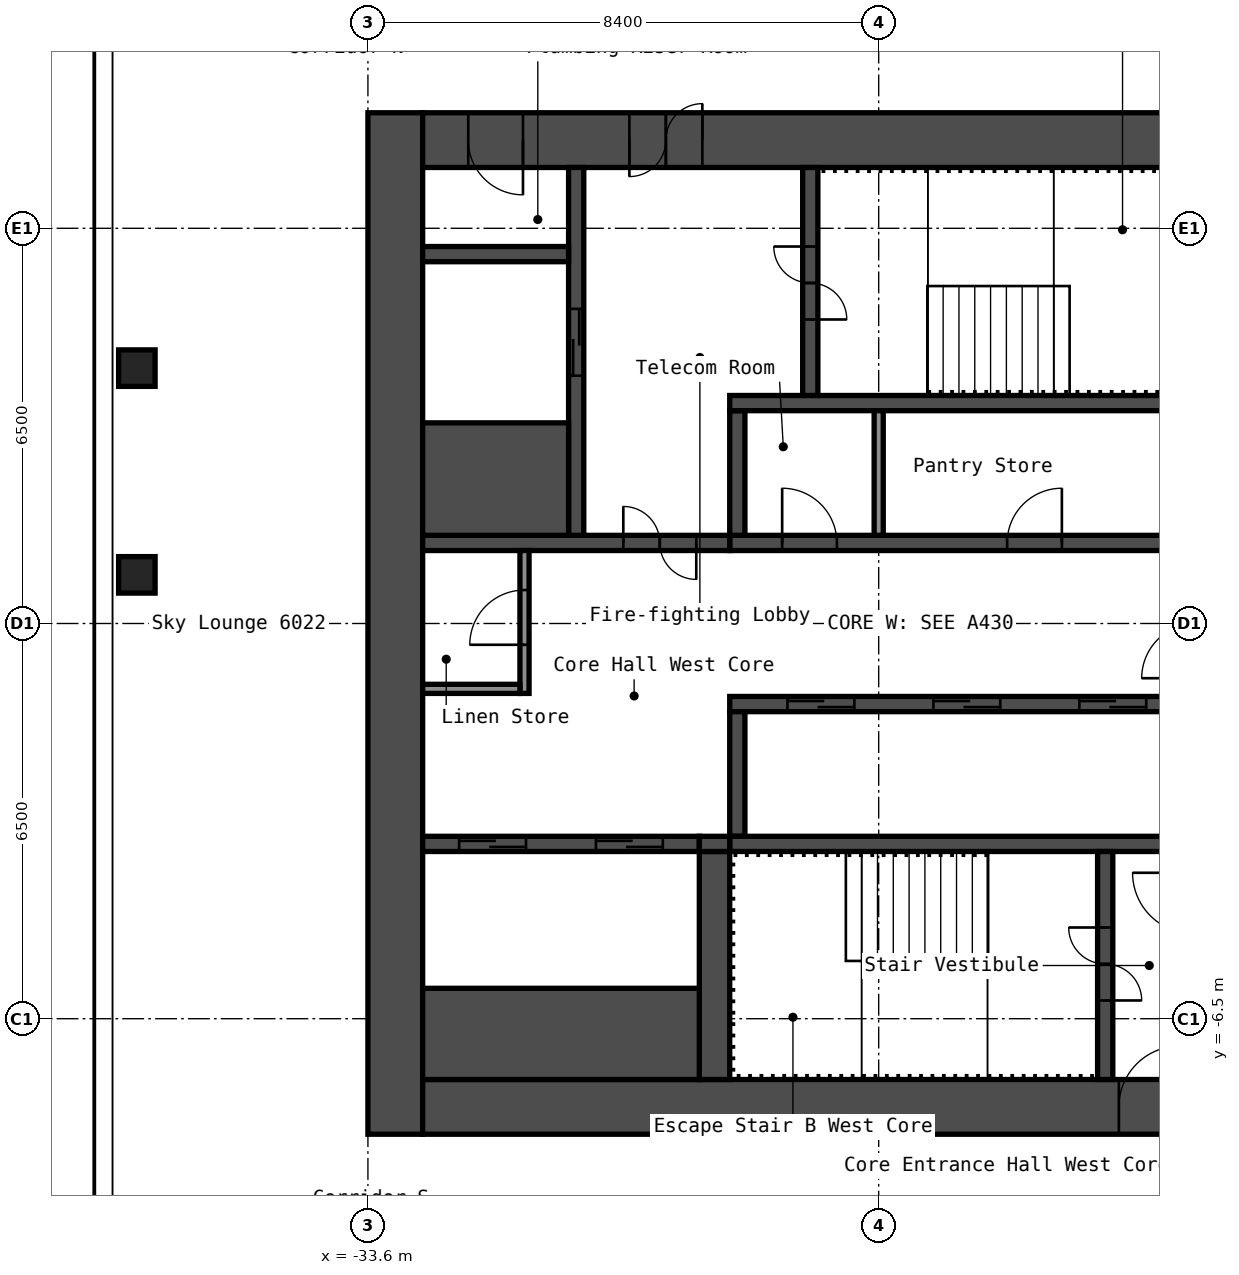
"""IFC4 building model, lengths in metres.
Left out: names, types, materials, properties, quantities, classifications, styles, units other than length and angle.
Written with IfcOpenShell. Run it as: python <this file> out.ifc"""

import sys

from ifc_helpers import new_model, si_unit, direction, frame, frame_2d, origin, origin_2d, place, context, subcontext, project, spatial, rectangle, hollow_rectangle, extrude, element, fill, save


model = new_model("IFC4")
c1 = context("Model", 3, precision=1e-05, world=origin(), true_north=direction((0.0, 1.0)))
c2 = subcontext(c1, "Body", "Model", "MODEL_VIEW")
j1 = project(units=[si_unit("LENGTHUNIT", "METRE"), si_unit("PLANEANGLEUNIT", "RADIAN")], contexts=[c1])
p1 = place(None, origin())
s1 = spatial("IfcSite", under=j1, at=p1, CompositionType="ELEMENT")
p2 = place(p1, origin())
s2 = spatial("IfcBuilding", under=s1, at=p2, CompositionType="ELEMENT")
p3 = place(p2, frame((0.0, 0.0, 212.2)))
s3 = spatial("IfcBuildingStorey", under=s2, at=p3, CompositionType="ELEMENT", Elevation=212.2)
for number, where, z_axis, x_axis in (
    (1, (-37.4, 0.8, 0.0), (0.0, 0.0, 1.0), (1.0, 0.0, 0.0)),
    (2, (-37.4, 4.2, 0.0), (0.0, 0.0, 1.0), (1.0, 0.0, 0.0)),
):
    element("IfcColumn", number, at=place(p3, frame(where, z_axis=z_axis, x_axis=x_axis)), inside=s3, PredefinedType="COLUMN", context=c2, shape_type="SweptSolid", body=[
        extrude(hollow_rectangle(XDim=0.6, YDim=0.6, WallThickness=0.025, InnerFilletRadius=0.038, OuterFilletRadius=0.062, at=origin_2d()), origin(), (0.0, 0.0, 1.0), 2.75),
    ])
p4 = place(p3, frame((-33.15, -8.4, 0.0), z_axis=(0.0, 0.0, 1.0), x_axis=(0.0, 1.0, 0.0)))
e3 = element("IfcWall", 3, at=p4, inside=s3, PredefinedType="SHEAR", context=c2, shape_type="SweptSolid", body=[
    extrude(rectangle(XDim=16.8, YDim=0.9, at=frame_2d((8.4, 0.0))), origin(), (0.0, 0.0, 1.0), 2.75),
])
p5 = place(p3, frame((-32.7, 7.95, 0.0), z_axis=(0.0, 0.0, 1.0), x_axis=(1.0, 0.0, 0.0)))
e4 = element("IfcWall", 4, at=p5, inside=s3, PredefinedType="SHEAR", context=c2, shape_type="SweptSolid", body=[
    extrude(rectangle(XDim=15.0, YDim=0.9, at=frame_2d((7.5, 0.0))), origin(), (0.0, 0.0, 1.0), 2.75),
])
p6 = place(p5, frame((3.4, 0.0, 0.0)))
e5 = element("IfcOpeningElement", 5, at=p6, cuts=e4, PredefinedType="OPENING", context=c2, shape_type="SweptSolid", body=[
    extrude(rectangle(XDim=1.2, YDim=2.1, at=frame_2d((0.6, 1.05))), frame((0.0, 0.46, 0.0), z_axis=(0.0, -1.0, 0.0), x_axis=(1.0, 0.0, 0.0)), (0.0, 0.0, 1.0), 0.92),
])
p7 = place(p5, frame((0.75, 0.0, 0.0)))
e6 = element("IfcOpeningElement", 6, at=p7, cuts=e4, PredefinedType="OPENING", context=c2, shape_type="SweptSolid", body=[
    extrude(rectangle(XDim=0.9, YDim=2.1, at=frame_2d((0.45, 1.05))), frame((0.0, 0.46, 0.0), z_axis=(0.0, -1.0, 0.0), x_axis=(1.0, 0.0, 0.0)), (0.0, 0.0, 1.0), 0.92),
])
p8 = place(p3, frame((-32.7, -7.95, 0.0), z_axis=(0.0, 0.0, 1.0), x_axis=(1.0, 0.0, 0.0)))
e7 = element("IfcWall", 7, at=p8, inside=s3, PredefinedType="SHEAR", context=c2, shape_type="SweptSolid", body=[
    extrude(rectangle(XDim=15.0, YDim=0.9, at=frame_2d((7.5, 0.0))), origin(), (0.0, 0.0, 1.0), 2.75),
])
p9 = place(p8, frame((11.45, 0.0, 0.0)))
e8 = element("IfcOpeningElement", 8, at=p9, cuts=e7, PredefinedType="OPENING", context=c2, shape_type="SweptSolid", body=[
    extrude(rectangle(XDim=1.0, YDim=2.1, at=frame_2d((0.5, 1.05))), frame((0.0, 0.46, 0.0), z_axis=(0.0, -1.0, 0.0), x_axis=(1.0, 0.0, 0.0)), (0.0, 0.0, 1.0), 0.92),
])
p10 = place(p3, frame((-27.65, 1.325, 0.0), z_axis=(0.0, 0.0, 1.0), x_axis=(1.0, 0.0, 0.0)))
e9 = element("IfcWall", 9, at=p10, inside=s3, PredefinedType="SHEAR", context=c2, shape_type="SweptSolid", body=[
    extrude(rectangle(XDim=7.5, YDim=0.25, at=frame_2d((3.75, 0.0))), origin(), (0.0, 0.0, 1.0), 2.75),
])
p11 = place(p10, frame((4.562, 0.0, 0.0)))
e10 = element("IfcOpeningElement", 10, at=p11, cuts=e9, PredefinedType="OPENING", context=c2, shape_type="SweptSolid", body=[
    extrude(rectangle(XDim=0.9, YDim=2.1, at=frame_2d((0.45, 1.05))), frame((0.0, 0.135, 0.0), z_axis=(0.0, -1.0, 0.0), x_axis=(1.0, 0.0, 0.0)), (0.0, 0.0, 1.0), 0.27),
])
p12 = place(p10, frame((0.863, 0.0, 0.0)))
e11 = element("IfcOpeningElement", 11, at=p12, cuts=e9, PredefinedType="OPENING", context=c2, shape_type="SweptSolid", body=[
    extrude(rectangle(XDim=0.9, YDim=2.1, at=frame_2d((0.45, 1.05))), frame((0.0, 0.135, 0.0), z_axis=(0.0, -1.0, 0.0), x_axis=(1.0, 0.0, 0.0)), (0.0, 0.0, 1.0), 0.27),
])
p13 = place(p3, frame((-27.525, 1.45, 0.0), z_axis=(0.0, 0.0, 1.0), x_axis=(0.0, 1.0, 0.0)))
e12 = element("IfcWall", 12, at=p13, inside=s3, PredefinedType="SHEAR", context=c2, shape_type="SweptSolid", body=[
    extrude(rectangle(XDim=2.05, YDim=0.25, at=frame_2d((1.025, 0.0))), origin(), (0.0, 0.0, 1.0), 2.75),
])
p14 = place(p3, frame((-27.65, 3.625, 0.0), z_axis=(0.0, 0.0, 1.0), x_axis=(1.0, 0.0, 0.0)))
e13 = element("IfcWall", 13, at=p14, inside=s3, PredefinedType="SHEAR", context=c2, shape_type="SweptSolid", body=[
    extrude(rectangle(XDim=7.5, YDim=0.25, at=frame_2d((3.75, 0.0))), origin(), (0.0, 0.0, 1.0), 2.75),
])
p15 = place(p3, frame((-26.325, 3.75, 0.0), z_axis=(0.0, 0.0, 1.0), x_axis=(0.0, 1.0, 0.0)))
e14 = element("IfcWall", 14, at=p15, inside=s3, PredefinedType="SHEAR", context=c2, shape_type="SweptSolid", body=[
    extrude(rectangle(XDim=3.75, YDim=0.25, at=frame_2d((1.875, 0.0))), origin(), (0.0, 0.0, 1.0), 2.75),
])
p16 = place(p15, frame((1.25, 0.0, 0.0)))
e15 = element("IfcOpeningElement", 15, at=p16, cuts=e14, PredefinedType="OPENING", context=c2, shape_type="SweptSolid", body=[
    extrude(rectangle(XDim=1.2, YDim=2.1, at=frame_2d((0.6, 1.05))), frame((0.0, 0.135, 0.0), z_axis=(0.0, -1.0, 0.0), x_axis=(1.0, 0.0, 0.0)), (0.0, 0.0, 1.0), 0.27),
])
p17 = place(p3, frame((-32.7, 1.325, 0.0), z_axis=(0.0, 0.0, 1.0), x_axis=(1.0, 0.0, 0.0)))
e16 = element("IfcWall", 16, at=p17, inside=s3, PredefinedType="SHEAR", context=c2, shape_type="SweptSolid", body=[
    extrude(rectangle(XDim=5.05, YDim=0.25, at=frame_2d((2.525, 0.0))), origin(), (0.0, 0.0, 1.0), 2.75),
])
p18 = place(p17, frame((3.3, 0.0, 0.0)))
e17 = element("IfcOpeningElement", 17, at=p18, cuts=e16, PredefinedType="OPENING", context=c2, shape_type="SweptSolid", body=[
    extrude(rectangle(XDim=1.2, YDim=2.1, at=frame_2d((0.6, 1.05))), frame((0.0, 0.135, 0.0), z_axis=(0.0, -1.0, 0.0), x_axis=(1.0, 0.0, 0.0)), (0.0, 0.0, 1.0), 0.27),
])
p19 = place(p3, frame((-30.175, 1.45, 0.0), z_axis=(0.0, 0.0, 1.0), x_axis=(0.0, 1.0, 0.0)))
e18 = element("IfcWall", 18, at=p19, inside=s3, PredefinedType="SHEAR", context=c2, shape_type="SweptSolid", body=[
    extrude(rectangle(XDim=6.05, YDim=0.25, at=frame_2d((3.025, 0.0))), origin(), (0.0, 0.0, 1.0), 2.75),
])
p20 = place(p19, frame((2.625, 0.0, 0.0)))
e19 = element("IfcOpeningElement", 19, at=p20, cuts=e18, PredefinedType="OPENING", context=c2, shape_type="SweptSolid", body=[
    extrude(rectangle(XDim=1.1, YDim=2.1, at=frame_2d((0.55, 1.05))), frame((0.0, 0.135, 0.0), z_axis=(0.0, -1.0, 0.0), x_axis=(1.0, 0.0, 0.0)), (0.0, 0.0, 1.0), 0.27),
])
p21 = place(p3, frame((-32.7, 2.375, 0.0), z_axis=(0.0, 0.0, 1.0), x_axis=(1.0, 0.0, 0.0)))
e20 = element("IfcWall", 20, at=p21, inside=s3, PredefinedType="SHEAR", context=c2, shape_type="SweptSolid", body=[
    extrude(rectangle(XDim=2.4, YDim=1.85, at=frame_2d((1.2, 0.0))), origin(), (0.0, 0.0, 1.0), 2.75),
])
p22 = place(p3, frame((-32.7, 6.075, 0.0), z_axis=(0.0, 0.0, 1.0), x_axis=(1.0, 0.0, 0.0)))
e21 = element("IfcWall", 21, at=p22, inside=s3, PredefinedType="SHEAR", context=c2, shape_type="SweptSolid", body=[
    extrude(rectangle(XDim=2.4, YDim=0.25, at=frame_2d((1.2, 0.0))), origin(), (0.0, 0.0, 1.0), 2.75),
])
p23 = place(p3, frame((-27.65, -1.325, 0.0), z_axis=(0.0, 0.0, 1.0), x_axis=(1.0, 0.0, 0.0)))
e22 = element("IfcWall", 22, at=p23, inside=s3, PredefinedType="SHEAR", context=c2, shape_type="SweptSolid", body=[
    extrude(rectangle(XDim=7.5, YDim=0.25, at=frame_2d((3.75, 0.0))), origin(), (0.0, 0.0, 1.0), 2.75),
])
p24 = place(p23, frame((5.75, 0.0, 0.0)))
e23 = element("IfcOpeningElement", 23, at=p24, cuts=e22, PredefinedType="OPENING", context=c2, shape_type="SweptSolid", body=[
    extrude(rectangle(XDim=1.1, YDim=2.1, at=frame_2d((0.55, 1.05))), frame((0.0, 0.135, 0.0), z_axis=(0.0, -1.0, 0.0), x_axis=(1.0, 0.0, 0.0)), (0.0, 0.0, 1.0), 0.27),
])
p25 = place(p23, frame((3.35, 0.0, 0.0)))
e24 = element("IfcOpeningElement", 24, at=p25, cuts=e22, PredefinedType="OPENING", context=c2, shape_type="SweptSolid", body=[
    extrude(rectangle(XDim=1.1, YDim=2.1, at=frame_2d((0.55, 1.05))), frame((0.0, 0.135, 0.0), z_axis=(0.0, -1.0, 0.0), x_axis=(1.0, 0.0, 0.0)), (0.0, 0.0, 1.0), 0.27),
])
p26 = place(p23, frame((0.95, 0.0, 0.0)))
e25 = element("IfcOpeningElement", 25, at=p26, cuts=e22, PredefinedType="OPENING", context=c2, shape_type="SweptSolid", body=[
    extrude(rectangle(XDim=1.1, YDim=2.1, at=frame_2d((0.55, 1.05))), frame((0.0, 0.135, 0.0), z_axis=(0.0, -1.0, 0.0), x_axis=(1.0, 0.0, 0.0)), (0.0, 0.0, 1.0), 0.27),
])
p27 = place(p3, frame((-27.525, -3.5, 0.0), z_axis=(0.0, 0.0, 1.0), x_axis=(0.0, 1.0, 0.0)))
e26 = element("IfcWall", 26, at=p27, inside=s3, PredefinedType="SHEAR", context=c2, shape_type="SweptSolid", body=[
    extrude(rectangle(XDim=2.05, YDim=0.25, at=frame_2d((1.025, 0.0))), origin(), (0.0, 0.0, 1.0), 2.75),
])
p28 = place(p3, frame((-27.65, -3.625, 0.0), z_axis=(0.0, 0.0, 1.0), x_axis=(1.0, 0.0, 0.0)))
e27 = element("IfcWall", 27, at=p28, inside=s3, PredefinedType="SHEAR", context=c2, shape_type="SweptSolid", body=[
    extrude(rectangle(XDim=7.5, YDim=0.25, at=frame_2d((3.75, 0.0))), origin(), (0.0, 0.0, 1.0), 2.75),
])
p29 = place(p3, frame((-21.475, -7.5, 0.0), z_axis=(0.0, 0.0, 1.0), x_axis=(0.0, 1.0, 0.0)))
e28 = element("IfcWall", 28, at=p29, inside=s3, PredefinedType="SHEAR", context=c2, shape_type="SweptSolid", body=[
    extrude(rectangle(XDim=3.75, YDim=0.25, at=frame_2d((1.875, 0.0))), origin(), (0.0, 0.0, 1.0), 2.75),
])
p30 = place(p29, frame((1.3, 0.0, 0.0)))
e29 = element("IfcOpeningElement", 29, at=p30, cuts=e28, PredefinedType="OPENING", context=c2, shape_type="SweptSolid", body=[
    extrude(rectangle(XDim=1.2, YDim=2.1, at=frame_2d((0.6, 1.05))), frame((0.0, 0.135, 0.0), z_axis=(0.0, -1.0, 0.0), x_axis=(1.0, 0.0, 0.0)), (0.0, 0.0, 1.0), 0.27),
])
p31 = place(p3, frame((-27.9, -7.5, 0.0), z_axis=(0.0, 0.0, 1.0), x_axis=(0.0, 1.0, 0.0)))
e30 = element("IfcWall", 30, at=p31, inside=s3, PredefinedType="SHEAR", context=c2, shape_type="SweptSolid", body=[
    extrude(rectangle(XDim=3.75, YDim=0.5, at=frame_2d((1.875, 0.0))), origin(), (0.0, 0.0, 1.0), 2.75),
])
p32 = place(p3, frame((-32.7, -3.625, 0.0), z_axis=(0.0, 0.0, 1.0), x_axis=(1.0, 0.0, 0.0)))
e31 = element("IfcWall", 31, at=p32, inside=s3, PredefinedType="SHEAR", context=c2, shape_type="SweptSolid", body=[
    extrude(rectangle(XDim=4.55, YDim=0.25, at=frame_2d((2.275, 0.0))), origin(), (0.0, 0.0, 1.0), 2.75),
])
p33 = place(p32, frame((2.85, 0.0, 0.0)))
e32 = element("IfcOpeningElement", 32, at=p33, cuts=e31, PredefinedType="OPENING", context=c2, shape_type="SweptSolid", body=[
    extrude(rectangle(XDim=1.1, YDim=2.1, at=frame_2d((0.55, 1.05))), frame((0.0, 0.135, 0.0), z_axis=(0.0, -1.0, 0.0), x_axis=(1.0, 0.0, 0.0)), (0.0, 0.0, 1.0), 0.27),
])
p34 = place(p32, frame((0.6, 0.0, 0.0)))
e33 = element("IfcOpeningElement", 33, at=p34, cuts=e31, PredefinedType="OPENING", context=c2, shape_type="SweptSolid", body=[
    extrude(rectangle(XDim=1.1, YDim=2.1, at=frame_2d((0.55, 1.05))), frame((0.0, 0.135, 0.0), z_axis=(0.0, -1.0, 0.0), x_axis=(1.0, 0.0, 0.0)), (0.0, 0.0, 1.0), 0.27),
])
p35 = place(p3, frame((-32.7, -6.75, 0.0), z_axis=(0.0, 0.0, 1.0), x_axis=(1.0, 0.0, 0.0)))
e34 = element("IfcWall", 34, at=p35, inside=s3, PredefinedType="SHEAR", context=c2, shape_type="SweptSolid", body=[
    extrude(rectangle(XDim=4.55, YDim=1.5, at=frame_2d((2.275, 0.0))), origin(), (0.0, 0.0, 1.0), 2.75),
])
p36 = place(p3, frame((-28.15, -3.625, 0.0), z_axis=(0.0, 0.0, 1.0), x_axis=(1.0, 0.0, 0.0)))
e35 = element("IfcWall", 35, at=p36, inside=s3, PredefinedType="SHEAR", context=c2, shape_type="SweptSolid", body=[
    extrude(rectangle(XDim=0.5, YDim=0.25, at=frame_2d((0.25, 0.0))), origin(), (0.0, 0.0, 1.0), 2.75),
])
p37 = place(p3, frame((-31.025, -1.15, 0.0), z_axis=(0.0, 0.0, 1.0), x_axis=(0.0, 1.0, 0.0)))
e36 = element("IfcWall", 36, at=p37, inside=s3, PredefinedType="PARTITIONING", context=c2, shape_type="SweptSolid", body=[
    extrude(rectangle(XDim=2.35, YDim=0.15, at=frame_2d((1.175, 0.0))), origin(), (0.0, 0.0, 1.0), 2.75),
])
p38 = place(p37, frame((0.8, 0.0, 0.0)))
e37 = element("IfcOpeningElement", 37, at=p38, cuts=e36, PredefinedType="OPENING", context=c2, shape_type="SweptSolid", body=[
    extrude(rectangle(XDim=0.9, YDim=2.1, at=frame_2d((0.45, 1.05))), frame((0.0, 0.085, 0.0), z_axis=(0.0, -1.0, 0.0), x_axis=(1.0, 0.0, 0.0)), (0.0, 0.0, 1.0), 0.17),
])
p39 = place(p3, frame((-32.7, -1.075, 0.0), z_axis=(0.0, 0.0, 1.0), x_axis=(1.0, 0.0, 0.0)))
e38 = element("IfcWall", 38, at=p39, inside=s3, PredefinedType="PARTITIONING", context=c2, shape_type="SweptSolid", body=[
    extrude(rectangle(XDim=1.6, YDim=0.15, at=frame_2d((0.8, 0.0))), origin(), (0.0, 0.0, 1.0), 2.75),
])
p40 = place(p3, frame((-25.2, 1.45, 0.0), z_axis=(0.0, 0.0, 1.0), x_axis=(0.0, 1.0, 0.0)))
e39 = element("IfcWall", 39, at=p40, inside=s3, PredefinedType="PARTITIONING", context=c2, shape_type="SweptSolid", body=[
    extrude(rectangle(XDim=2.05, YDim=0.15, at=frame_2d((1.025, 0.0))), origin(), (0.0, 0.0, 1.0), 2.75),
])
p41 = place(p6, origin())
e40 = element("IfcDoor", 40, at=p41, inside=s3, OperationType="DOUBLE_DOOR_SINGLE_SWING", PredefinedType="DOOR", context=c2, shape_type="SweptSolid", body=[
    extrude(rectangle(XDim=1.2, YDim=2.1, at=frame_2d((0.6, 1.05))), frame((0.0, 0.025, 0.0), z_axis=(0.0, -1.0, 0.0), x_axis=(1.0, 0.0, 0.0)), (0.0, 0.0, 1.0), 0.05),
])
fill(e5, e40)
p42 = place(p7, origin())
e41 = element("IfcDoor", 41, at=p42, inside=s3, OperationType="SINGLE_SWING_RIGHT", PredefinedType="DOOR", context=c2, shape_type="SweptSolid", body=[
    extrude(rectangle(XDim=0.9, YDim=2.1, at=frame_2d((0.45, 1.05))), frame((0.0, 0.025, 0.0), z_axis=(0.0, -1.0, 0.0), x_axis=(1.0, 0.0, 0.0)), (0.0, 0.0, 1.0), 0.05),
])
fill(e6, e41)
p43 = place(p9, origin())
e42 = element("IfcDoor", 42, at=p43, inside=s3, OperationType="SINGLE_SWING_LEFT", PredefinedType="DOOR", context=c2, shape_type="SweptSolid", body=[
    extrude(rectangle(XDim=1.0, YDim=2.1, at=frame_2d((0.5, 1.05))), frame((0.0, 0.025, 0.0), z_axis=(0.0, -1.0, 0.0), x_axis=(1.0, 0.0, 0.0)), (0.0, 0.0, 1.0), 0.05),
])
fill(e8, e42)
p44 = place(p16, origin())
e43 = element("IfcDoor", 43, at=p44, inside=s3, OperationType="DOUBLE_DOOR_SINGLE_SWING", PredefinedType="DOOR", context=c2, shape_type="SweptSolid", body=[
    extrude(rectangle(XDim=1.2, YDim=2.1, at=frame_2d((0.6, 1.05))), frame((0.0, 0.025, 0.0), z_axis=(0.0, -1.0, 0.0), x_axis=(1.0, 0.0, 0.0)), (0.0, 0.0, 1.0), 0.05),
])
fill(e15, e43)
p45 = place(p30, origin())
e44 = element("IfcDoor", 44, at=p45, inside=s3, OperationType="DOUBLE_DOOR_SINGLE_SWING", PredefinedType="DOOR", context=c2, shape_type="SweptSolid", body=[
    extrude(rectangle(XDim=1.2, YDim=2.1, at=frame_2d((0.6, 1.05))), frame((0.0, 0.025, 0.0), z_axis=(0.0, -1.0, 0.0), x_axis=(1.0, 0.0, 0.0)), (0.0, 0.0, 1.0), 0.05),
])
fill(e29, e44)
p46 = place(p18, origin())
e45 = element("IfcDoor", 45, at=p46, inside=s3, OperationType="DOUBLE_DOOR_SINGLE_SWING", PredefinedType="DOOR", context=c2, shape_type="SweptSolid", body=[
    extrude(rectangle(XDim=1.2, YDim=2.1, at=frame_2d((0.6, 1.05))), frame((0.0, 0.025, 0.0), z_axis=(0.0, -1.0, 0.0), x_axis=(1.0, 0.0, 0.0)), (0.0, 0.0, 1.0), 0.05),
])
fill(e17, e45)
p47 = place(p38, origin())
e46 = element("IfcDoor", 46, at=p47, inside=s3, OperationType="SINGLE_SWING_RIGHT", PredefinedType="DOOR", context=c2, shape_type="SweptSolid", body=[
    extrude(rectangle(XDim=0.9, YDim=2.1, at=frame_2d((0.45, 1.05))), frame((0.0, 0.025, 0.0), z_axis=(0.0, -1.0, 0.0), x_axis=(1.0, 0.0, 0.0)), (0.0, 0.0, 1.0), 0.05),
])
fill(e37, e46)
p48 = place(p11, origin())
e47 = element("IfcDoor", 47, at=p48, inside=s3, OperationType="SINGLE_SWING_LEFT", PredefinedType="DOOR", context=c2, shape_type="SweptSolid", body=[
    extrude(rectangle(XDim=0.9, YDim=2.1, at=frame_2d((0.45, 1.05))), frame((0.0, 0.025, 0.0), z_axis=(0.0, -1.0, 0.0), x_axis=(1.0, 0.0, 0.0)), (0.0, 0.0, 1.0), 0.05),
])
fill(e10, e47)
p49 = place(p12, origin())
e48 = element("IfcDoor", 48, at=p49, inside=s3, OperationType="SINGLE_SWING_RIGHT", PredefinedType="DOOR", context=c2, shape_type="SweptSolid", body=[
    extrude(rectangle(XDim=0.9, YDim=2.1, at=frame_2d((0.45, 1.05))), frame((0.0, 0.025, 0.0), z_axis=(0.0, -1.0, 0.0), x_axis=(1.0, 0.0, 0.0)), (0.0, 0.0, 1.0), 0.05),
])
fill(e11, e48)
p50 = place(p24, origin())
e49 = element("IfcDoor", 49, at=p50, inside=s3, OperationType="DOUBLE_DOOR_SLIDING", PredefinedType="DOOR", context=c2, shape_type="SweptSolid", body=[
    extrude(rectangle(XDim=1.1, YDim=2.1, at=frame_2d((0.55, 1.05))), frame((0.0, 0.025, 0.0), z_axis=(0.0, -1.0, 0.0), x_axis=(1.0, 0.0, 0.0)), (0.0, 0.0, 1.0), 0.05),
])
fill(e23, e49)
p51 = place(p25, origin())
e50 = element("IfcDoor", 50, at=p51, inside=s3, OperationType="DOUBLE_DOOR_SLIDING", PredefinedType="DOOR", context=c2, shape_type="SweptSolid", body=[
    extrude(rectangle(XDim=1.1, YDim=2.1, at=frame_2d((0.55, 1.05))), frame((0.0, 0.025, 0.0), z_axis=(0.0, -1.0, 0.0), x_axis=(1.0, 0.0, 0.0)), (0.0, 0.0, 1.0), 0.05),
])
fill(e24, e50)
p52 = place(p26, origin())
e51 = element("IfcDoor", 51, at=p52, inside=s3, OperationType="DOUBLE_DOOR_SLIDING", PredefinedType="DOOR", context=c2, shape_type="SweptSolid", body=[
    extrude(rectangle(XDim=1.1, YDim=2.1, at=frame_2d((0.55, 1.05))), frame((0.0, 0.025, 0.0), z_axis=(0.0, -1.0, 0.0), x_axis=(1.0, 0.0, 0.0)), (0.0, 0.0, 1.0), 0.05),
])
fill(e25, e51)
p53 = place(p20, origin())
e52 = element("IfcDoor", 52, at=p53, inside=s3, OperationType="DOUBLE_DOOR_SLIDING", PredefinedType="DOOR", context=c2, shape_type="SweptSolid", body=[
    extrude(rectangle(XDim=1.1, YDim=2.1, at=frame_2d((0.55, 1.05))), frame((0.0, 0.025, 0.0), z_axis=(0.0, -1.0, 0.0), x_axis=(1.0, 0.0, 0.0)), (0.0, 0.0, 1.0), 0.05),
])
fill(e19, e52)
p54 = place(p33, origin())
e53 = element("IfcDoor", 53, at=p54, inside=s3, OperationType="DOUBLE_DOOR_SLIDING", PredefinedType="DOOR", context=c2, shape_type="SweptSolid", body=[
    extrude(rectangle(XDim=1.1, YDim=2.1, at=frame_2d((0.55, 1.05))), frame((0.0, 0.025, 0.0), z_axis=(0.0, -1.0, 0.0), x_axis=(1.0, 0.0, 0.0)), (0.0, 0.0, 1.0), 0.05),
])
fill(e32, e53)
p55 = place(p34, origin())
e54 = element("IfcDoor", 54, at=p55, inside=s3, OperationType="DOUBLE_DOOR_SLIDING", PredefinedType="DOOR", context=c2, shape_type="SweptSolid", body=[
    extrude(rectangle(XDim=1.1, YDim=2.1, at=frame_2d((0.55, 1.05))), frame((0.0, 0.025, 0.0), z_axis=(0.0, -1.0, 0.0), x_axis=(1.0, 0.0, 0.0)), (0.0, 0.0, 1.0), 0.05),
])
fill(e33, e54)
save(model, sys.argv[1])
